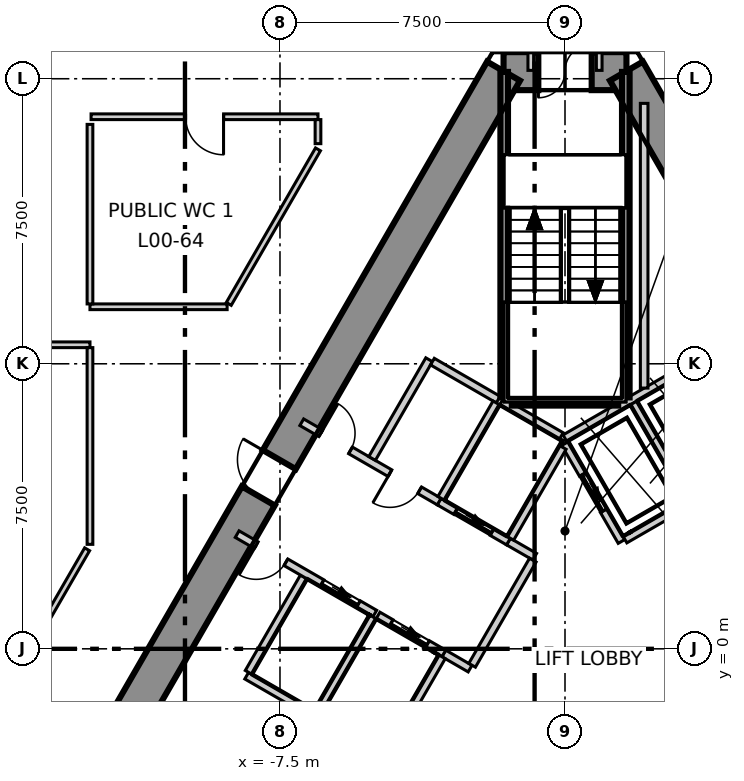
"""IFC4 building model, lengths in metres.
Left out: names, types, materials, properties, quantities, classifications, styles, units other than length and angle.
Written with IfcOpenShell. Run it as: python <this file> out.ifc"""

import sys

from ifc_helpers import new_model, si_unit, direction, frame, frame_2d, origin, place, context, subcontext, project, spatial, polyline, rectangle, outline, extrude, element, fill, save


model = new_model("IFC4")
c1 = context("Model", 3, precision=1e-05, world=origin(), true_north=direction((0.0, 1.0)))
c2 = subcontext(c1, "Body", "Model", "MODEL_VIEW")
j1 = project(units=[si_unit("LENGTHUNIT", "METRE"), si_unit("PLANEANGLEUNIT", "RADIAN")], contexts=[c1])
p1 = place(None, origin())
s1 = spatial("IfcSite", under=j1, at=p1, CompositionType="ELEMENT")
p2 = place(p1, origin())
s2 = spatial("IfcBuilding", under=s1, at=p2, CompositionType="ELEMENT")
p3 = place(p2, origin())
s3 = spatial("IfcBuildingStorey", under=s2, at=p3, CompositionType="ELEMENT", Elevation=0.0)
p4 = place(p3, frame((1.617, 15.2, -0.4), z_axis=(0.0, 0.0, 1.0), x_axis=(-1.0, 0.0, 0.0)))
e1 = element("IfcWall", 1, at=p4, inside=s3, PredefinedType="SHEAR", context=c2, shape_type="SweptSolid", body=[
    extrude(outline(polyline([(-0.288, -0.5), (1.617, -0.5), (3.522, -0.5), (2.945, 0.5), (1.617, 0.5), (0.289, 0.5), (-0.288, -0.5)])), origin(), (0.0, 0.0, 1.0), 8.5),
])
p5 = place(p4, frame((0.917, 0.0, 0.4)))
e2 = element("IfcOpeningElement", 2, at=p5, cuts=e1, PredefinedType="OPENING", context=c2, shape_type="SweptSolid", body=[
    extrude(rectangle(XDim=1.4, YDim=2.1, at=frame_2d((0.7, 1.05))), frame((0.0, 0.51, 0.0), z_axis=(0.0, -1.0, 0.0), x_axis=(1.0, 0.0, 0.0)), (0.0, 0.0, 1.0), 1.02),
])
p6 = place(p3, frame((-1.617, 15.2, -0.4), z_axis=(0.0, 0.0, 1.0), x_axis=(-0.499992141631, -0.866029940768, 0.0)))
e3 = element("IfcWall", 3, at=p6, inside=s3, PredefinedType="SHEAR", context=c2, shape_type="SweptSolid", body=[
    extrude(outline(polyline([(-0.289, -0.499), (1.656, -0.499), (3.601, -0.499), (5.547, -0.499), (7.492, -0.499), (9.437, -0.5), (11.382, -0.5), (13.328, -0.5), (15.273, -0.5), (17.218, -0.5), (19.163, -0.5), (21.109, -0.5), (23.054, -0.5), (24.999, -0.5), (24.422, 0.5), (22.566, 0.5), (20.709, 0.5), (18.853, 0.5), (16.997, 0.5), (15.14, 0.5), (13.284, 0.5), (11.427, 0.5), (9.571, 0.5), (7.715, 0.5), (5.858, 0.5), (4.002, 0.5), (2.146, 0.5), (0.289, 0.5), (-0.289, -0.499)])), origin(), (0.0, 0.0, 1.0), 8.5),
])
p7 = place(p6, frame((11.805, 0.0, 0.4)))
e4 = element("IfcOpeningElement", 4, at=p7, cuts=e3, PredefinedType="OPENING", context=c2, shape_type="SweptSolid", body=[
    extrude(rectangle(XDim=1.1, YDim=2.1, at=frame_2d((0.55, 1.05))), frame((0.0, 0.51, 0.0), z_axis=(0.0, -1.0, 0.0), x_axis=(1.0, 0.0, 0.0)), (0.0, 0.0, 1.0), 1.02),
])
p8 = place(p3, frame((13.972, -6.2, -0.4), z_axis=(0.0, 0.0, 1.0), x_axis=(-0.499992141631, 0.866029940768, 0.0)))
e5 = element("IfcWall", 5, at=p8, inside=s3, PredefinedType="SHEAR", context=c2, shape_type="SweptSolid", body=[
    extrude(outline(polyline([(-0.288, -0.5), (1.657, -0.5), (3.602, -0.5), (5.547, -0.5), (7.493, -0.5), (9.438, -0.5), (11.383, -0.5), (13.328, -0.5), (15.273, -0.5), (17.218, -0.499), (19.164, -0.499), (21.109, -0.499), (23.054, -0.499), (24.999, -0.499), (24.422, 0.5), (22.566, 0.5), (20.709, 0.5), (18.853, 0.5), (16.996, 0.5), (15.14, 0.5), (13.283, 0.5), (11.427, 0.5), (9.57, 0.5), (7.714, 0.5), (5.857, 0.5), (4.001, 0.5), (2.145, 0.5), (0.288, 0.5), (-0.288, -0.5)])), origin(), (0.0, 0.0, 1.0), 8.5),
])
p9 = place(p8, frame((11.455, 0.0, 0.4)))
e6 = element("IfcOpeningElement", 6, at=p9, cuts=e5, PredefinedType="OPENING", context=c2, shape_type="SweptSolid", body=[
    extrude(rectangle(XDim=1.8, YDim=2.1, at=frame_2d((0.9, 1.05))), frame((0.0, 0.51, 0.0), z_axis=(0.0, -1.0, 0.0), x_axis=(1.0, 0.0, 0.0)), (0.0, 0.0, 1.0), 1.02),
])
p10 = place(p3, frame((-0.9, 15.22, 0.0), z_axis=(0.0, 0.0, 1.0), x_axis=(0.0, 1.0, 0.0)))
e7 = element("IfcWall", 7, at=p10, inside=s3, PredefinedType="PARTITIONING", context=c2, shape_type="SweptSolid", body=[
    extrude(rectangle(XDim=0.88, YDim=0.15, at=frame_2d((0.44, 0.0))), origin(), (0.0, 0.0, 1.0), 8.1),
])
p11 = place(p3, frame((0.9, 15.22, 0.0), z_axis=(0.0, 0.0, 1.0), x_axis=(0.0, 1.0, 0.0)))
e8 = element("IfcWall", 8, at=p11, inside=s3, PredefinedType="PARTITIONING", context=c2, shape_type="SweptSolid", body=[
    extrude(rectangle(XDim=2.605, YDim=0.15, at=frame_2d((1.302, 0.0))), origin(), (0.0, 0.0, 1.0), 8.1),
])
p12 = place(p3, frame((-12.5, 9.0, 0.0), z_axis=(0.0, 0.0, 1.0), x_axis=(1.0, 0.0, 0.0)))
e9 = element("IfcWall", 9, at=p12, inside=s3, PredefinedType="PARTITIONING", context=c2, shape_type="SweptSolid", body=[
    extrude(rectangle(XDim=3.609, YDim=0.15, at=frame_2d((1.804, 0.0))), origin(), (0.0, 0.0, 1.0), 8.1),
])
p13 = place(p3, frame((-12.471, 14.0, 0.0), z_axis=(0.0, 0.0, 1.0), x_axis=(1.0, 0.0, 0.0)))
e10 = element("IfcWall", 10, at=p13, inside=s3, PredefinedType="PARTITIONING", context=c2, shape_type="SweptSolid", body=[
    extrude(rectangle(XDim=5.971, YDim=0.15, at=frame_2d((2.985, 0.0))), origin(), (0.0, 0.0, 1.0), 8.1),
])
p14 = place(p13, frame((2.486, 0.0, 0.0)))
e11 = element("IfcOpeningElement", 11, at=p14, cuts=e10, PredefinedType="OPENING", context=c2, shape_type="SweptSolid", body=[
    extrude(rectangle(XDim=1.0, YDim=2.1, at=frame_2d((0.5, 1.05))), frame((0.0, 0.085, 0.0), z_axis=(0.0, -1.0, 0.0), x_axis=(1.0, 0.0, 0.0)), (0.0, 0.0, 1.0), 0.17),
])
p15 = place(p3, frame((-15.848, 8.0, 0.0), z_axis=(0.0, 0.0, 1.0), x_axis=(1.0, 0.0, 0.0)))
e12 = element("IfcWall", 12, at=p15, inside=s3, PredefinedType="PARTITIONING", context=c2, shape_type="SweptSolid", body=[
    extrude(rectangle(XDim=3.348, YDim=0.15, at=frame_2d((1.674, 0.0))), origin(), (0.0, 0.0, 1.0), 8.1),
])
p16 = place(p3, frame((-12.5, 2.749, 0.0), z_axis=(0.0, 0.0, 1.0), x_axis=(0.0, 1.0, 0.0)))
e13 = element("IfcWall", 13, at=p16, inside=s3, PredefinedType="PARTITIONING", context=c2, shape_type="SweptSolid", body=[
    extrude(rectangle(XDim=5.176, YDim=0.15, at=frame_2d((2.588, 0.0))), origin(), (0.0, 0.0, 1.0), 8.1),
])
p17 = place(p3, frame((-12.5, 9.075, 0.0), z_axis=(0.0, 0.0, 1.0), x_axis=(0.0, 1.0, 0.0)))
e14 = element("IfcWall", 14, at=p17, inside=s3, PredefinedType="PARTITIONING", context=c2, shape_type="SweptSolid", body=[
    extrude(rectangle(XDim=4.724, YDim=0.15, at=frame_2d((2.362, 0.0))), origin(), (0.0, 0.0, 1.0), 8.1),
])
p18 = place(p3, frame((-16.353, -3.925, 0.0), z_axis=(0.0, 0.0, 1.0), x_axis=(0.499992812315, 0.866029553557, 0.0)))
e15 = element("IfcWall", 15, at=p18, inside=s3, PredefinedType="PARTITIONING", context=c2, shape_type="SweptSolid", body=[
    extrude(rectangle(XDim=7.556, YDim=0.15, at=frame_2d((3.778, 0.0))), origin(), (0.0, 0.0, 1.0), 8.1),
])
p19 = place(p3, frame((-8.848, 9.075, 0.0), z_axis=(0.0, 0.0, 1.0), x_axis=(0.499957962765, 0.866049672633, 0.0)))
e16 = element("IfcWall", 16, at=p19, inside=s3, PredefinedType="PARTITIONING", context=c2, shape_type="SweptSolid", body=[
    extrude(rectangle(XDim=4.696, YDim=0.15, at=frame_2d((2.348, 0.0))), origin(), (0.0, 0.0, 1.0), 8.1),
])
p20 = place(p3, frame((-6.5, 13.292, 0.0), z_axis=(0.0, 0.0, 1.0), x_axis=(0.0, 1.0, 0.0)))
e17 = element("IfcWall", 17, at=p20, inside=s3, PredefinedType="PARTITIONING", context=c2, shape_type="SweptSolid", body=[
    extrude(rectangle(XDim=0.633, YDim=0.15, at=frame_2d((0.316, 0.0))), origin(), (0.0, 0.0, 1.0), 8.1),
])
p21 = place(p3, frame((-8.376, -0.707, 0.0), z_axis=(0.0, 0.0, 1.0), x_axis=(0.866067520717, -0.499927044236, 0.0)))
e18 = element("IfcWall", 18, at=p21, inside=s3, PredefinedType="SOLIDWALL", context=c2, shape_type="SweptSolid", body=[
    extrude(rectangle(XDim=2.1, YDim=0.2, at=frame_2d((1.05, 0.0))), origin(), (0.0, 0.0, 1.0), 8.1),
])
p22 = place(p3, frame((-8.326, -0.62, 0.0), z_axis=(0.0, 0.0, 1.0), x_axis=(0.500023687443, 0.866011727401, 0.0)))
e19 = element("IfcWall", 19, at=p22, inside=s3, PredefinedType="SOLIDWALL", context=c2, shape_type="SweptSolid", body=[
    extrude(rectangle(XDim=2.9, YDim=0.2, at=frame_2d((1.45, 0.0))), origin(), (0.0, 0.0, 1.0), 8.1),
])
p23 = place(p3, frame((-0.002, 5.541, 0.0), z_axis=(0.0, 0.0, 1.0), x_axis=(0.86600155993, 0.500041296494, 0.0)))
e20 = element("IfcWall", 20, at=p23, inside=s3, PredefinedType="SOLIDWALL", context=c2, shape_type="SweptSolid", body=[
    extrude(rectangle(XDim=4.132, YDim=0.2, at=frame_2d((2.066, 0.0))), origin(), (0.0, 0.0, 1.0), 8.1),
])
p24 = place(p3, frame((0.0, 5.4, 0.0), z_axis=(0.0, 0.0, 1.0), x_axis=(0.500103862429, -0.865965430478, 0.0)))
e21 = element("IfcWall", 21, at=p24, inside=s3, PredefinedType="SOLIDWALL", context=c2, shape_type="SweptSolid", body=[
    extrude(rectangle(XDim=2.973, YDim=0.2, at=frame_2d((1.487, 0.0))), origin(), (0.0, 0.0, 1.0), 8.1),
])
p25 = place(p24, frame((0.937, 0.0, 0.0)))
e22 = element("IfcOpeningElement", 22, at=p25, cuts=e21, PredefinedType="OPENING", context=c2, shape_type="SweptSolid", body=[
    extrude(rectangle(XDim=1.1, YDim=2.1, at=frame_2d((0.55, 1.05))), frame((0.0, 0.11, 0.0), z_axis=(0.0, -1.0, 0.0), x_axis=(1.0, 0.0, 0.0)), (0.0, 0.0, 1.0), 0.22),
])
p26 = place(p3, frame((1.578, 2.874, 0.0), z_axis=(0.0, 0.0, 1.0), x_axis=(0.866055259465, 0.499948284879, 0.0)))
e23 = element("IfcWall", 23, at=p26, inside=s3, PredefinedType="SOLIDWALL", context=c2, shape_type="SweptSolid", body=[
    extrude(rectangle(XDim=6.177, YDim=0.2, at=frame_2d((3.088, 0.0))), origin(), (0.0, 0.0, 1.0), 8.1),
])
p27 = place(p26, frame((2.496, 0.0, 0.0)))
e24 = element("IfcOpeningElement", 24, at=p27, cuts=e23, PredefinedType="OPENING", context=c2, shape_type="SweptSolid", body=[
    extrude(rectangle(XDim=1.1, YDim=2.1, at=frame_2d((0.55, 1.05))), frame((0.0, 0.11, 0.0), z_axis=(0.0, -1.0, 0.0), x_axis=(1.0, 0.0, 0.0)), (0.0, 0.0, 1.0), 0.22),
])
p28 = place(p26, frame((4.696, 0.0, 0.0)))
e25 = element("IfcOpeningElement", 25, at=p28, cuts=e23, PredefinedType="OPENING", context=c2, shape_type="SweptSolid", body=[
    extrude(rectangle(XDim=0.9, YDim=2.1, at=frame_2d((0.45, 1.05))), frame((0.0, 0.11, 0.0), z_axis=(0.0, -1.0, 0.0), x_axis=(1.0, 0.0, 0.0)), (0.0, 0.0, 1.0), 0.22),
])
p29 = place(p3, frame((1.807, 6.47, 0.0), z_axis=(0.0, 0.0, 1.0), x_axis=(0.50012328804, -0.865954211699, 0.0)))
e26 = element("IfcWall", 26, at=p29, inside=s3, PredefinedType="SOLIDWALL", context=c2, shape_type="SweptSolid", body=[
    extrude(rectangle(XDim=2.9, YDim=0.2, at=frame_2d((1.45, 0.0))), origin(), (0.0, 0.0, 1.0), 8.1),
])
p30 = place(p3, frame((-8.627, 3.018, 0.0), z_axis=(0.0, 0.0, 1.0), x_axis=(0.866039775641, -0.499975106388, 0.0)))
e27 = element("IfcWall", 27, at=p30, inside=s3, PredefinedType="SOLIDWALL", context=c2, shape_type="SweptSolid", body=[
    extrude(rectangle(XDim=4.182, YDim=0.2, at=frame_2d((2.091, 0.0))), origin(), (0.0, 0.0, 1.0), 8.1),
])
p31 = place(p30, frame((2.58, 0.0, 0.0)))
e28 = element("IfcOpeningElement", 28, at=p31, cuts=e27, PredefinedType="OPENING", context=c2, shape_type="SweptSolid", body=[
    extrude(rectangle(XDim=1.1, YDim=2.1, at=frame_2d((0.55, 1.05))), frame((0.0, 0.11, 0.0), z_axis=(0.0, -1.0, 0.0), x_axis=(1.0, 0.0, 0.0)), (0.0, 0.0, 1.0), 0.22),
])
p32 = place(p30, frame((0.58, 0.0, 0.0)))
e29 = element("IfcOpeningElement", 29, at=p32, cuts=e27, PredefinedType="OPENING", context=c2, shape_type="SweptSolid", body=[
    extrude(rectangle(XDim=0.9, YDim=2.1, at=frame_2d((0.45, 1.05))), frame((0.0, 0.11, 0.0), z_axis=(0.0, -1.0, 0.0), x_axis=(1.0, 0.0, 0.0)), (0.0, 0.0, 1.0), 0.22),
])
p33 = place(p3, frame((-3.188, -0.122, 0.0), z_axis=(0.0, 0.0, 1.0), x_axis=(0.865705793592, -0.50055317294, 0.0)))
e30 = element("IfcWall", 30, at=p33, inside=s3, PredefinedType="SOLIDWALL", context=c2, shape_type="SweptSolid", body=[
    extrude(rectangle(XDim=0.797, YDim=0.2, at=frame_2d((0.398, 0.0))), origin(), (0.0, 0.0, 1.0), 8.1),
])
p34 = place(p3, frame((-6.927, 5.962, 0.0), z_axis=(0.0, 0.0, 1.0), x_axis=(0.866065051207, -0.49993132236, 0.0)))
e31 = element("IfcWall", 31, at=p34, inside=s3, PredefinedType="SOLIDWALL", context=c2, shape_type="SweptSolid", body=[
    extrude(rectangle(XDim=4.182, YDim=0.2, at=frame_2d((2.091, 0.0))), origin(), (0.0, 0.0, 1.0), 8.1),
])
p35 = place(p34, frame((2.68, 0.0, 0.0)))
e32 = element("IfcOpeningElement", 32, at=p35, cuts=e31, PredefinedType="OPENING", context=c2, shape_type="SweptSolid", body=[
    extrude(rectangle(XDim=0.9, YDim=2.1, at=frame_2d((0.45, 1.05))), frame((0.0, 0.11, 0.0), z_axis=(0.0, -1.0, 0.0), x_axis=(1.0, 0.0, 0.0)), (0.0, 0.0, 1.0), 0.22),
])
p36 = place(p34, frame((0.58, 0.0, 0.0)))
e33 = element("IfcOpeningElement", 33, at=p36, cuts=e31, PredefinedType="OPENING", context=c2, shape_type="SweptSolid", body=[
    extrude(rectangle(XDim=0.9, YDim=2.1, at=frame_2d((0.45, 1.05))), frame((0.0, 0.11, 0.0), z_axis=(0.0, -1.0, 0.0), x_axis=(1.0, 0.0, 0.0)), (0.0, 0.0, 1.0), 0.22),
])
p37 = place(p3, frame((-1.488, 2.822, 0.0), z_axis=(0.0, 0.0, 1.0), x_axis=(0.866236612152, -0.499633997809, 0.0)))
e34 = element("IfcWall", 34, at=p37, inside=s3, PredefinedType="SOLIDWALL", context=c2, shape_type="SweptSolid", body=[
    extrude(rectangle(XDim=0.796, YDim=0.2, at=frame_2d((0.398, 0.0))), origin(), (0.0, 0.0, 1.0), 8.1),
])
p38 = place(p3, frame((-5.076, 5.009, 0.0), z_axis=(0.0, 0.0, 1.0), x_axis=(0.50002537861, 0.866010750942, 0.0)))
e35 = element("IfcWall", 35, at=p38, inside=s3, PredefinedType="SOLIDWALL", context=c2, shape_type="SweptSolid", body=[
    extrude(rectangle(XDim=3.0, YDim=0.2, at=frame_2d((1.5, 0.0))), origin(), (0.0, 0.0, 1.0), 8.1),
])
p39 = place(p3, frame((-3.489, 7.557, 0.0), z_axis=(0.0, 0.0, 1.0), x_axis=(0.866010750942, -0.50002537861, 0.0)))
e36 = element("IfcWall", 36, at=p39, inside=s3, PredefinedType="SOLIDWALL", context=c2, shape_type="SweptSolid", body=[
    extrude(rectangle(XDim=2.0, YDim=0.2, at=frame_2d((1.0, 0.0))), origin(), (0.0, 0.0, 1.0), 8.1),
])
p40 = place(p3, frame((-2.444, -0.433, 0.0), z_axis=(0.0, 0.0, 1.0), x_axis=(0.500035624827, 0.866004834804, 0.0)))
e37 = element("IfcWall", 37, at=p40, inside=s3, PredefinedType="SOLIDWALL", context=c2, shape_type="SweptSolid", body=[
    extrude(rectangle(XDim=3.194, YDim=0.2, at=frame_2d((1.597, 0.0))), origin(), (0.0, 0.0, 1.0), 8.1),
])
p41 = place(p3, frame((-6.507, -1.67, 0.0), z_axis=(0.0, 0.0, 1.0), x_axis=(0.50012328804, 0.865954211699, 0.0)))
e38 = element("IfcWall", 38, at=p41, inside=s3, PredefinedType="SOLIDWALL", context=c2, shape_type="SweptSolid", body=[
    extrude(rectangle(XDim=2.9, YDim=0.2, at=frame_2d((1.45, 0.0))), origin(), (0.0, 0.0, 1.0), 8.1),
])
p42 = place(p3, frame((-4.92, 0.878, 0.0), z_axis=(0.0, 0.0, 1.0), x_axis=(0.866010750942, -0.50002537861, 0.0)))
e39 = element("IfcWall", 39, at=p42, inside=s3, PredefinedType="SOLIDWALL", context=c2, shape_type="SweptSolid", body=[
    extrude(rectangle(XDim=2.0, YDim=0.2, at=frame_2d((1.0, 0.0))), origin(), (0.0, 0.0, 1.0), 8.1),
])
p43 = place(p42, frame((0.4, 0.0, 0.0)))
e40 = element("IfcOpeningElement", 40, at=p43, cuts=e39, PredefinedType="OPENING", context=c2, shape_type="SweptSolid", body=[
    extrude(rectangle(XDim=1.1, YDim=2.1, at=frame_2d((0.55, 1.05))), frame((0.0, 0.11, 0.0), z_axis=(0.0, -1.0, 0.0), x_axis=(1.0, 0.0, 0.0)), (0.0, 0.0, 1.0), 0.22),
])
p44 = place(p3, frame((-4.619, -2.6, 0.0), z_axis=(0.0, 0.0, 1.0), x_axis=(0.50009492287, 0.865970593103, 0.0)))
e41 = element("IfcWall", 41, at=p44, inside=s3, PredefinedType="SOLIDWALL", context=c2, shape_type="SweptSolid", body=[
    extrude(rectangle(XDim=2.761, YDim=0.2, at=frame_2d((1.381, 0.0))), origin(), (0.0, 0.0, 1.0), 8.1),
])
p45 = place(p3, frame((-3.309, 3.873, 0.0), z_axis=(0.0, 0.0, 1.0), x_axis=(0.866098583652, -0.499873227325, 0.0)))
e42 = element("IfcWall", 42, at=p45, inside=s3, PredefinedType="SOLIDWALL", context=c2, shape_type="SweptSolid", body=[
    extrude(rectangle(XDim=2.103, YDim=0.2, at=frame_2d((1.051, 0.0))), origin(), (0.0, 0.0, 1.0), 8.1),
])
p46 = place(p45, frame((0.502, 0.0, 0.0)))
e43 = element("IfcOpeningElement", 43, at=p46, cuts=e42, PredefinedType="OPENING", context=c2, shape_type="SweptSolid", body=[
    extrude(rectangle(XDim=1.1, YDim=2.1, at=frame_2d((0.55, 1.05))), frame((0.0, 0.11, 0.0), z_axis=(0.0, -1.0, 0.0), x_axis=(1.0, 0.0, 0.0)), (0.0, 0.0, 1.0), 0.22),
])
p47 = place(p3, frame((-3.257, 3.959, 0.0), z_axis=(0.0, 0.0, 1.0), x_axis=(0.50012328804, 0.865954211699, 0.0)))
e44 = element("IfcWall", 44, at=p47, inside=s3, PredefinedType="SOLIDWALL", context=c2, shape_type="SweptSolid", body=[
    extrude(rectangle(XDim=2.9, YDim=0.2, at=frame_2d((1.45, 0.0))), origin(), (0.0, 0.0, 1.0), 8.1),
])
p48 = place(p3, frame((-1.67, 6.507, 0.0), z_axis=(0.0, 0.0, 1.0), x_axis=(0.865941441609, -0.500145398563, 0.0)))
e45 = element("IfcWall", 45, at=p48, inside=s3, PredefinedType="SOLIDWALL", context=c2, shape_type="SweptSolid", body=[
    extrude(rectangle(XDim=1.815, YDim=0.2, at=frame_2d((0.908, 0.0))), origin(), (0.0, 0.0, 1.0), 8.1),
])
p49 = place(p3, frame((-1.438, 2.909, 0.0), z_axis=(0.0, 0.0, 1.0), x_axis=(0.499829630636, 0.866123744241, 0.0)))
e46 = element("IfcWall", 46, at=p49, inside=s3, PredefinedType="SOLIDWALL", context=c2, shape_type="SweptSolid", body=[
    extrude(rectangle(XDim=2.761, YDim=0.2, at=frame_2d((1.38, 0.0))), origin(), (0.0, 0.0, 1.0), 8.1),
])
p50 = place(p3, frame((2.083, 6.861, 0.0), z_axis=(0.0, 0.0, 1.0), x_axis=(0.0, 1.0, 0.0)))
e47 = element("IfcWall", 47, at=p50, inside=s3, PredefinedType="SOLIDWALL", context=c2, shape_type="SweptSolid", body=[
    extrude(rectangle(XDim=7.491, YDim=0.2, at=frame_2d((3.746, 0.0))), origin(), (0.0, 0.0, 1.0), 8.1),
])
p51 = place(p3, frame((1.6, 6.615, 0.0), z_axis=(0.0, 0.0, 1.0), x_axis=(0.0, 1.0, 0.0)))
e48 = element("IfcWall", 48, at=p51, inside=s3, PredefinedType="SOLIDWALL", context=c2, shape_type="SweptSolid", body=[
    extrude(rectangle(XDim=8.565, YDim=0.2, at=frame_2d((4.282, 0.0))), origin(), (0.0, 0.0, 1.0), 8.1),
])
p52 = place(p3, frame((-1.4, 6.5, 0.0), z_axis=(0.0, 0.0, 1.0), x_axis=(1.0, 0.0, 0.0)))
e49 = element("IfcWall", 49, at=p52, inside=s3, PredefinedType="SOLIDWALL", context=c2, shape_type="SweptSolid", body=[
    extrude(rectangle(XDim=2.8, YDim=0.2, at=frame_2d((1.4, 0.0))), origin(), (0.0, 0.0, 1.0), 8.1),
])
p53 = place(p3, frame((-1.6, 6.615, 0.0), z_axis=(0.0, 0.0, 1.0), x_axis=(0.0, 1.0, 0.0)))
e50 = element("IfcWall", 50, at=p53, inside=s3, PredefinedType="SOLIDWALL", context=c2, shape_type="SweptSolid", body=[
    extrude(rectangle(XDim=8.565, YDim=0.2, at=frame_2d((4.282, 0.0))), origin(), (0.0, 0.0, 1.0), 8.1),
])
p54 = place(p25, origin())
e51 = element("IfcDoor", 51, at=p54, inside=s3, OperationType="SLIDING_TO_LEFT", PredefinedType="DOOR", context=c2, shape_type="SweptSolid", body=[
    extrude(rectangle(XDim=1.1, YDim=2.1, at=frame_2d((0.55, 1.05))), frame((0.0, 0.025, 0.0), z_axis=(0.0, -1.0, 0.0), x_axis=(1.0, 0.0, 0.0)), (0.0, 0.0, 1.0), 0.05),
])
fill(e22, e51)
p55 = place(p43, origin())
e52 = element("IfcDoor", 52, at=p55, inside=s3, OperationType="SLIDING_TO_LEFT", PredefinedType="DOOR", context=c2, shape_type="SweptSolid", body=[
    extrude(rectangle(XDim=1.1, YDim=2.1, at=frame_2d((0.55, 1.05))), frame((0.0, 0.025, 0.0), z_axis=(0.0, -1.0, 0.0), x_axis=(1.0, 0.0, 0.0)), (0.0, 0.0, 1.0), 0.05),
])
fill(e40, e52)
p56 = place(p46, origin())
e53 = element("IfcDoor", 53, at=p56, inside=s3, OperationType="SLIDING_TO_LEFT", PredefinedType="DOOR", context=c2, shape_type="SweptSolid", body=[
    extrude(rectangle(XDim=1.1, YDim=2.1, at=frame_2d((0.55, 1.05))), frame((0.0, 0.025, 0.0), z_axis=(0.0, -1.0, 0.0), x_axis=(1.0, 0.0, 0.0)), (0.0, 0.0, 1.0), 0.05),
])
fill(e43, e53)
p57 = place(p31, origin())
e54 = element("IfcDoor", 54, at=p57, inside=s3, OperationType="SLIDING_TO_LEFT", PredefinedType="DOOR", context=c2, shape_type="SweptSolid", body=[
    extrude(rectangle(XDim=1.1, YDim=2.1, at=frame_2d((0.55, 1.05))), frame((0.0, 0.025, 0.0), z_axis=(0.0, -1.0, 0.0), x_axis=(1.0, 0.0, 0.0)), (0.0, 0.0, 1.0), 0.05),
])
fill(e28, e54)
p58 = place(p35, origin())
e55 = element("IfcDoor", 55, at=p58, inside=s3, OperationType="SINGLE_SWING_LEFT", PredefinedType="DOOR", context=c2, shape_type="SweptSolid", body=[
    extrude(rectangle(XDim=0.9, YDim=2.1, at=frame_2d((0.45, 1.05))), frame((0.0, 0.025, 0.0), z_axis=(0.0, -1.0, 0.0), x_axis=(1.0, 0.0, 0.0)), (0.0, 0.0, 1.0), 0.05),
])
fill(e32, e55)
p59 = place(p14, origin())
e56 = element("IfcDoor", 56, at=p59, inside=s3, OperationType="SINGLE_SWING_RIGHT", PredefinedType="DOOR", context=c2, shape_type="SweptSolid", body=[
    extrude(rectangle(XDim=1.0, YDim=2.1, at=frame_2d((0.5, 1.05))), frame((0.0, 0.025, 0.0), z_axis=(0.0, -1.0, 0.0), x_axis=(1.0, 0.0, 0.0)), (0.0, 0.0, 1.0), 0.05),
])
fill(e11, e56)
p60 = place(p5, origin())
e57 = element("IfcDoor", 57, at=p60, inside=s3, OperationType="DOUBLE_DOOR_SINGLE_SWING", PredefinedType="DOOR", context=c2, shape_type="SweptSolid", body=[
    extrude(rectangle(XDim=1.4, YDim=2.1, at=frame_2d((0.7, 1.05))), frame((0.0, 0.025, 0.0), z_axis=(0.0, -1.0, 0.0), x_axis=(1.0, 0.0, 0.0)), (0.0, 0.0, 1.0), 0.05),
])
fill(e2, e57)
p61 = place(p7, origin())
e58 = element("IfcDoor", 58, at=p61, inside=s3, OperationType="SINGLE_SWING_LEFT", PredefinedType="DOOR", context=c2, shape_type="SweptSolid", body=[
    extrude(rectangle(XDim=1.1, YDim=2.1, at=frame_2d((0.55, 1.05))), frame((0.0, 0.025, 0.0), z_axis=(0.0, -1.0, 0.0), x_axis=(1.0, 0.0, 0.0)), (0.0, 0.0, 1.0), 0.05),
])
fill(e4, e58)
p62 = place(p32, origin())
e59 = element("IfcDoor", 59, at=p62, inside=s3, OperationType="SINGLE_SWING_LEFT", PredefinedType="DOOR", context=c2, shape_type="SweptSolid", body=[
    extrude(rectangle(XDim=0.9, YDim=2.1, at=frame_2d((0.45, 1.05))), frame((0.0, 0.025, 0.0), z_axis=(0.0, -1.0, 0.0), x_axis=(1.0, 0.0, 0.0)), (0.0, 0.0, 1.0), 0.05),
])
fill(e29, e59)
p63 = place(p36, origin())
e60 = element("IfcDoor", 60, at=p63, inside=s3, OperationType="SINGLE_SWING_RIGHT", PredefinedType="DOOR", context=c2, shape_type="SweptSolid", body=[
    extrude(rectangle(XDim=0.9, YDim=2.1, at=frame_2d((0.45, 1.05))), frame((0.0, 0.025, 0.0), z_axis=(0.0, -1.0, 0.0), x_axis=(1.0, 0.0, 0.0)), (0.0, 0.0, 1.0), 0.05),
])
fill(e33, e60)
save(model, sys.argv[1])
